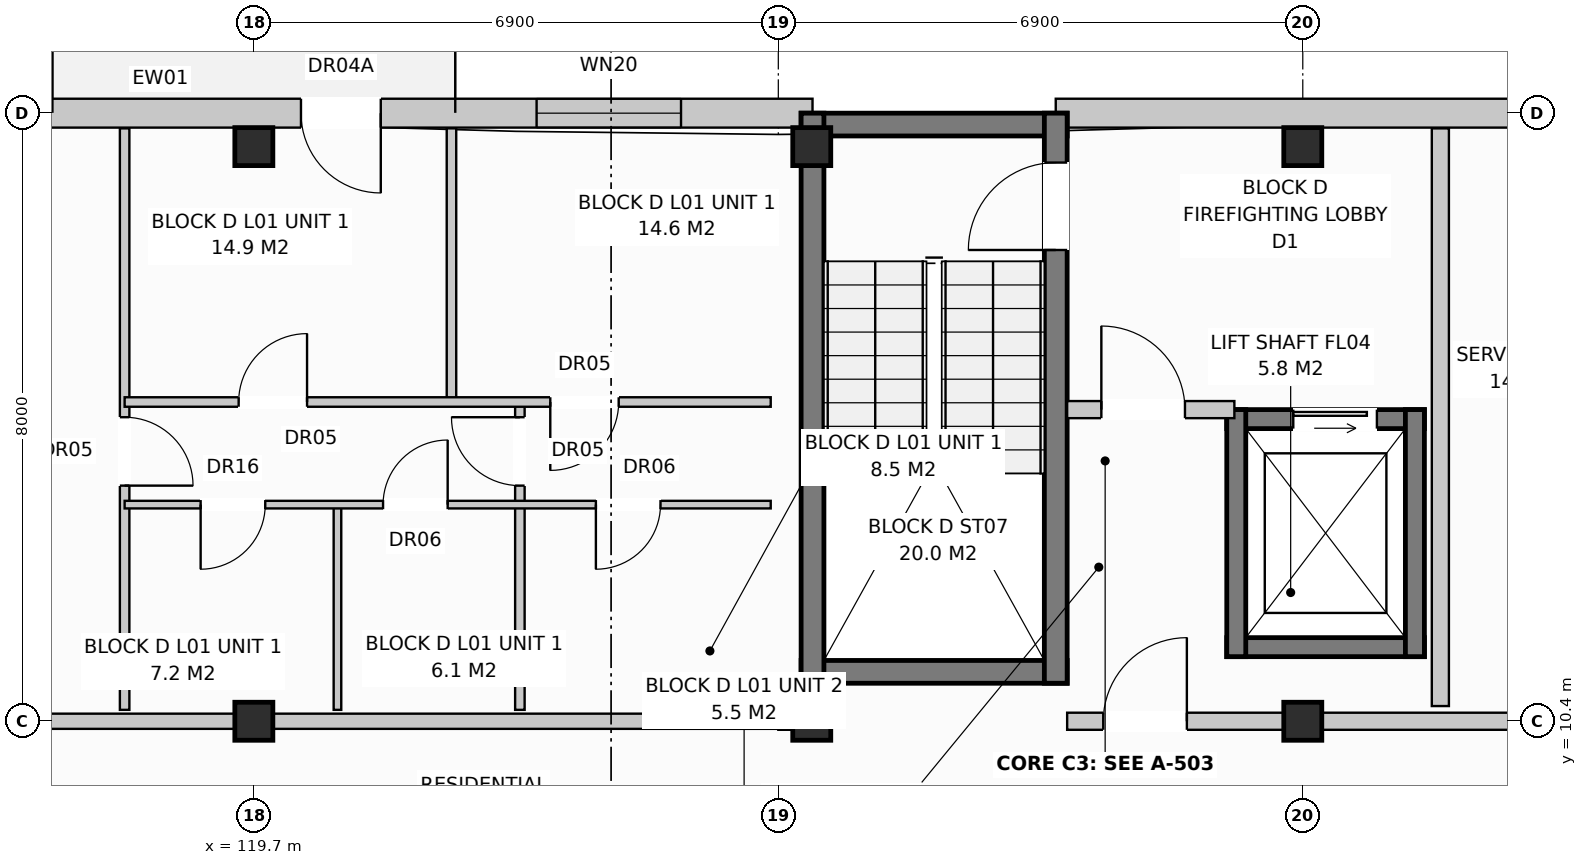
"""IFC4 building model, lengths in metres.
Left out: names, types, materials, properties, quantities, classifications, styles, units other than length and angle.
Written with IfcOpenShell. Run it as: python <this file> out.ifc"""

import sys

from ifc_helpers import new_model, si_unit, direction, frame, frame_2d, origin, origin_with_axes, origin_2d, place, context, subcontext, project, spatial, rectangle, extrude, element, fill, save


model = new_model("IFC4")
c1 = context("Model", 3, precision=1e-05, world=origin(), true_north=direction((0.0, 1.0)))
c2 = subcontext(c1, "Body", "Model", "MODEL_VIEW")
j1 = project(units=[si_unit("LENGTHUNIT", "METRE"), si_unit("PLANEANGLEUNIT", "RADIAN")], contexts=[c1])
p1 = place(None, origin())
s1 = spatial("IfcSite", under=j1, at=p1, CompositionType="ELEMENT")
p2 = place(p1, origin())
s2 = spatial("IfcBuilding", under=s1, at=p2, CompositionType="ELEMENT")
p3 = place(p2, frame((0.0, 0.0, 4.4)))
s3 = spatial("IfcBuildingStorey", under=s2, at=p3, CompositionType="ELEMENT", Elevation=4.4)
for number, where, z_axis, x_axis in (
    (1, (119.7, 10.4, 0.0), (0.0, 0.0, 1.0), (1.0, 0.0, 0.0)),
    (2, (119.7, 17.96, 0.0), (0.0, 0.0, 1.0), (1.0, 0.0, 0.0)),
    (3, (127.04, 10.4, 0.0), (0.0, 0.0, 1.0), (1.0, 0.0, 0.0)),
    (4, (127.04, 17.96, 0.0), (0.0, 0.0, 1.0), (1.0, 0.0, 0.0)),
    (5, (133.5, 10.4, 0.0), (0.0, 0.0, 1.0), (1.0, 0.0, 0.0)),
    (6, (133.5, 17.96, 0.0), (0.0, 0.0, 1.0), (1.0, 0.0, 0.0)),
):
    element("IfcColumn", number, at=place(p3, frame(where, z_axis=z_axis, x_axis=x_axis)), inside=s3, PredefinedType="COLUMN", context=c2, shape_type="SweptSolid", body=[
        extrude(rectangle(XDim=0.5, YDim=0.5, at=origin_2d()), origin(), (0.0, 0.0, 1.0), 3.6),
    ])
p4 = place(p3, frame((112.98, 18.4, 0.0), z_axis=(0.0, 0.0, 1.0), x_axis=(1.0, 0.0, 0.0)))
e7 = element("IfcWall", 7, at=p4, inside=s3, PredefinedType="STANDARD", context=c2, shape_type="SweptSolid", body=[
    extrude(rectangle(XDim=14.07, YDim=0.38, at=frame_2d((7.035, 0.0))), origin(), (0.0, 0.0, 1.0), 3.33),
])
p5 = place(p4, frame((7.34, 0.0, 0.0)))
e8 = element("IfcOpeningElement", 8, at=p5, cuts=e7, PredefinedType="OPENING", context=c2, shape_type="SweptSolid", body=[
    extrude(rectangle(XDim=1.05, YDim=2.12, at=frame_2d((0.525, 1.06))), frame((0.0, 0.202, 0.0), z_axis=(0.0, -1.0, 0.0), x_axis=(1.0, 0.0, 0.0)), (0.0, 0.0, 1.0), 0.404),
])
p6 = place(p4, frame((1.59, 0.0, 0.8)))
e9 = element("IfcOpeningElement", 9, at=p6, cuts=e7, PredefinedType="OPENING", context=c2, shape_type="SweptSolid", body=[
    extrude(rectangle(XDim=1.8, YDim=1.7, at=frame_2d((0.9, 0.85))), frame((0.0, 0.202, 0.0), z_axis=(0.0, -1.0, 0.0), x_axis=(1.0, 0.0, 0.0)), (0.0, 0.0, 1.0), 0.404),
])
p7 = place(p4, frame((10.44, 0.0, 0.8)))
e10 = element("IfcOpeningElement", 10, at=p7, cuts=e7, PredefinedType="OPENING", context=c2, shape_type="SweptSolid", body=[
    extrude(rectangle(XDim=1.9, YDim=1.85, at=frame_2d((0.95, 0.925))), frame((0.0, 0.202, 0.0), z_axis=(0.0, -1.0, 0.0), x_axis=(1.0, 0.0, 0.0)), (0.0, 0.0, 1.0), 0.404),
])
p8 = place(p3, frame((130.25, 18.4, 0.0), z_axis=(0.0, 0.0, 1.0), x_axis=(1.0, 0.0, 0.0)))
e11 = element("IfcWall", 11, at=p8, inside=s3, PredefinedType="STANDARD", context=c2, shape_type="SweptSolid", body=[
    extrude(rectangle(XDim=17.5, YDim=0.38, at=frame_2d((8.75, 0.0))), origin(), (0.0, 0.0, 1.0), 3.33),
])
p9 = place(p8, frame((11.923, 0.0, 0.0)))
e12 = element("IfcOpeningElement", 12, at=p9, cuts=e11, PredefinedType="OPENING", context=c2, shape_type="SweptSolid", body=[
    extrude(rectangle(XDim=1.05, YDim=2.12, at=frame_2d((0.525, 1.06))), frame((0.0, 0.202, 0.0), z_axis=(0.0, -1.0, 0.0), x_axis=(1.0, 0.0, 0.0)), (0.0, 0.0, 1.0), 0.404),
])
p10 = place(p8, frame((10.72, 0.0, 0.9)))
e13 = element("IfcOpeningElement", 13, at=p10, cuts=e11, PredefinedType="OPENING", context=c2, shape_type="SweptSolid", body=[
    extrude(rectangle(XDim=0.95, YDim=1.55, at=frame_2d((0.475, 0.775))), frame((0.0, 0.202, 0.0), z_axis=(0.0, -1.0, 0.0), x_axis=(1.0, 0.0, 0.0)), (0.0, 0.0, 1.0), 0.404),
])
p11 = place(p8, frame((14.62, 0.0, 0.8)))
e14 = element("IfcOpeningElement", 14, at=p11, cuts=e11, PredefinedType="OPENING", context=c2, shape_type="SweptSolid", body=[
    extrude(rectangle(XDim=1.8, YDim=1.7, at=frame_2d((0.9, 0.85))), frame((0.0, 0.202, 0.0), z_axis=(0.0, -1.0, 0.0), x_axis=(1.0, 0.0, 0.0)), (0.0, 0.0, 1.0), 0.404),
])
for number, where, z_axis, x_axis in (
    (15, (126.9, 18.25, 0.0), (0.0, 0.0, 1.0), (1.0, 0.0, 0.0)),
    (16, (126.9, 11.05, 0.0), (0.0, 0.0, 1.0), (1.0, 0.0, 0.0)),
):
    element("IfcWall", number, at=place(p3, frame(where, z_axis=z_axis, x_axis=x_axis)), inside=s3, PredefinedType="SHEAR", context=c2, shape_type="SweptSolid", body=[
        extrude(rectangle(XDim=3.5, YDim=0.3, at=frame_2d((1.75, 0.0))), origin(), (0.0, 0.0, 1.0), 3.33),
    ])
p12 = place(p3, frame((127.05, 10.9, 0.0), z_axis=(0.0, 0.0, 1.0), x_axis=(0.0, 1.0, 0.0)))
e17 = element("IfcWall", 17, at=p12, inside=s3, PredefinedType="SHEAR", context=c2, shape_type="SweptSolid", body=[
    extrude(rectangle(XDim=7.5, YDim=0.3, at=frame_2d((3.75, 0.0))), origin(), (0.0, 0.0, 1.0), 3.33),
])
p13 = place(p3, frame((130.25, 10.9, 0.0), z_axis=(0.0, 0.0, 1.0), x_axis=(0.0, 1.0, 0.0)))
e18 = element("IfcWall", 18, at=p13, inside=s3, PredefinedType="SHEAR", context=c2, shape_type="SweptSolid", body=[
    extrude(rectangle(XDim=7.5, YDim=0.3, at=frame_2d((3.75, 0.0))), origin(), (0.0, 0.0, 1.0), 3.33),
])
p14 = place(p13, frame((5.7, 0.0, 0.0)))
e19 = element("IfcOpeningElement", 19, at=p14, cuts=e18, PredefinedType="OPENING", context=c2, shape_type="SweptSolid", body=[
    extrude(rectangle(XDim=1.15, YDim=2.15, at=frame_2d((0.575, 1.075))), frame((0.0, 0.162, 0.0), z_axis=(0.0, -1.0, 0.0), x_axis=(1.0, 0.0, 0.0)), (0.0, 0.0, 1.0), 0.324),
])
p15 = place(p3, frame((132.5, 14.375, 0.0), z_axis=(0.0, 0.0, 1.0), x_axis=(1.0, 0.0, 0.0)))
e20 = element("IfcWall", 20, at=p15, inside=s3, PredefinedType="SHEAR", context=c2, shape_type="SweptSolid", body=[
    extrude(rectangle(XDim=2.6, YDim=0.25, at=frame_2d((1.3, 0.0))), origin(), (0.0, 0.0, 1.0), 3.33),
])
p16 = place(p15, frame((0.875, 0.0, 0.0)))
e21 = element("IfcOpeningElement", 21, at=p16, cuts=e20, PredefinedType="OPENING", context=c2, shape_type="SweptSolid", body=[
    extrude(rectangle(XDim=1.1, YDim=2.1, at=frame_2d((0.55, 1.05))), frame((0.0, 0.137, 0.0), z_axis=(0.0, -1.0, 0.0), x_axis=(1.0, 0.0, 0.0)), (0.0, 0.0, 1.0), 0.274),
])
p17 = place(p3, frame((132.5, 11.375, 0.0), z_axis=(0.0, 0.0, 1.0), x_axis=(1.0, 0.0, 0.0)))
e22 = element("IfcWall", 22, at=p17, inside=s3, PredefinedType="SHEAR", context=c2, shape_type="SweptSolid", body=[
    extrude(rectangle(XDim=2.6, YDim=0.25, at=frame_2d((1.3, 0.0))), origin(), (0.0, 0.0, 1.0), 3.33),
])
for number, where, z_axis, x_axis in (
    (23, (132.625, 11.25, 0.0), (0.0, 0.0, 1.0), (0.0, 1.0, 0.0)),
    (24, (134.975, 11.25, 0.0), (0.0, 0.0, 1.0), (0.0, 1.0, 0.0)),
):
    element("IfcWall", number, at=place(p3, frame(where, z_axis=z_axis, x_axis=x_axis)), inside=s3, PredefinedType="SHEAR", context=c2, shape_type="SweptSolid", body=[
        extrude(rectangle(XDim=3.25, YDim=0.25, at=frame_2d((1.625, 0.0))), origin(), (0.0, 0.0, 1.0), 3.33),
    ])
p18 = place(p3, frame((135.31, 10.6, 0.0), z_axis=(0.0, 0.0, 1.0), x_axis=(0.0, 1.0, 0.0)))
e25 = element("IfcWall", 25, at=p18, inside=s3, PredefinedType="PARTITIONING", context=c2, shape_type="SweptSolid", body=[
    extrude(rectangle(XDim=7.6, YDim=0.225, at=frame_2d((3.8, 0.0))), origin(), (0.0, 0.0, 1.0), 2.99),
])
p19 = place(p3, frame((130.4, 14.5, 0.0), z_axis=(0.0, 0.0, 1.0), x_axis=(1.0, 0.0, 0.0)))
e26 = element("IfcWall", 26, at=p19, inside=s3, PredefinedType="PARTITIONING", context=c2, shape_type="SweptSolid", body=[
    extrude(rectangle(XDim=2.2, YDim=0.225, at=frame_2d((1.1, 0.0))), origin(), (0.0, 0.0, 1.0), 3.33),
])
p20 = place(p19, frame((0.45, 0.0, 0.0)))
e27 = element("IfcOpeningElement", 27, at=p20, cuts=e26, PredefinedType="OPENING", context=c2, shape_type="SweptSolid", body=[
    extrude(rectangle(XDim=1.1, YDim=2.15, at=frame_2d((0.55, 1.075))), frame((0.0, 0.125, 0.0), z_axis=(0.0, -1.0, 0.0), x_axis=(1.0, 0.0, 0.0)), (0.0, 0.0, 1.0), 0.249),
])
p21 = place(p3, frame((126.6, 10.4, 0.0), z_axis=(0.0, 0.0, 1.0), x_axis=(1.0, 0.0, 0.0)))
e28 = element("IfcWall", 28, at=p21, inside=s3, PredefinedType="PARTITIONING", context=c2, shape_type="SweptSolid", body=[
    extrude(rectangle(XDim=0.3, YDim=0.225, at=frame_2d((0.15, 0.0))), origin(), (0.0, 0.0, 1.0), 3.33),
])
p22 = place(p3, frame((130.4, 10.4, 0.0), z_axis=(0.0, 0.0, 1.0), x_axis=(1.0, 0.0, 0.0)))
e29 = element("IfcWall", 29, at=p22, inside=s3, PredefinedType="PARTITIONING", context=c2, shape_type="SweptSolid", body=[
    extrude(rectangle(XDim=10.0, YDim=0.225, at=frame_2d((5.0, 0.0))), origin(), (0.0, 0.0, 1.0), 2.77),
])
p23 = place(p22, frame((0.475, 0.0, 0.0)))
e30 = element("IfcOpeningElement", 30, at=p23, cuts=e29, PredefinedType="OPENING", context=c2, shape_type="SweptSolid", body=[
    extrude(rectangle(XDim=1.1, YDim=2.15, at=frame_2d((0.55, 1.075))), frame((0.0, 0.125, 0.0), z_axis=(0.0, -1.0, 0.0), x_axis=(1.0, 0.0, 0.0)), (0.0, 0.0, 1.0), 0.249),
])
p24 = place(p22, frame((5.85, 0.0, 0.0)))
e31 = element("IfcOpeningElement", 31, at=p24, cuts=e29, PredefinedType="OPENING", context=c2, shape_type="SweptSolid", body=[
    extrude(rectangle(XDim=0.9, YDim=2.1, at=frame_2d((0.45, 1.05))), frame((0.0, 0.125, 0.0), z_axis=(0.0, -1.0, 0.0), x_axis=(1.0, 0.0, 0.0)), (0.0, 0.0, 1.0), 0.249),
])
p25 = place(p22, frame((7.9, 0.0, 0.0)))
e32 = element("IfcOpeningElement", 32, at=p25, cuts=e29, PredefinedType="OPENING", context=c2, shape_type="SweptSolid", body=[
    extrude(rectangle(XDim=0.95, YDim=2.15, at=frame_2d((0.475, 1.075))), frame((0.0, 0.125, 0.0), z_axis=(0.0, -1.0, 0.0), x_axis=(1.0, 0.0, 0.0)), (0.0, 0.0, 1.0), 0.249),
])
p26 = place(p3, frame((112.8, 10.4, 0.0), z_axis=(0.0, 0.0, 1.0), x_axis=(1.0, 0.0, 0.0)))
e33 = element("IfcWall", 33, at=p26, inside=s3, PredefinedType="PARTITIONING", context=c2, shape_type="SweptSolid", body=[
    extrude(rectangle(XDim=13.8, YDim=0.2, at=frame_2d((6.9, 0.0))), origin(), (0.0, 0.0, 1.0), 2.77),
])
p27 = place(p26, frame((2.4, 0.0, 0.0)))
e34 = element("IfcOpeningElement", 34, at=p27, cuts=e33, PredefinedType="OPENING", context=c2, shape_type="SweptSolid", body=[
    extrude(rectangle(XDim=0.95, YDim=2.15, at=frame_2d((0.475, 1.075))), frame((0.0, 0.112, 0.0), z_axis=(0.0, -1.0, 0.0), x_axis=(1.0, 0.0, 0.0)), (0.0, 0.0, 1.0), 0.224),
])
p28 = place(p3, frame((118.0, 10.55, 0.0), z_axis=(0.0, 0.0, 1.0), x_axis=(0.0, 1.0, 0.0)))
e35 = element("IfcWall", 35, at=p28, inside=s3, PredefinedType="PARTITIONING", context=c2, shape_type="SweptSolid", body=[
    extrude(rectangle(XDim=7.65, YDim=0.125, at=frame_2d((3.825, 0.0))), origin(), (0.0, 0.0, 1.0), 3.33),
])
p29 = place(p28, frame((2.95, 0.0, 0.0)))
e36 = element("IfcOpeningElement", 36, at=p29, cuts=e35, PredefinedType="OPENING", context=c2, shape_type="SweptSolid", body=[
    extrude(rectangle(XDim=0.9, YDim=2.1, at=frame_2d((0.45, 1.05))), frame((0.0, 0.074, 0.0), z_axis=(0.0, -1.0, 0.0), x_axis=(1.0, 0.0, 0.0)), (0.0, 0.0, 1.0), 0.149),
])
p30 = place(p3, frame((120.8, 10.55, 0.0), z_axis=(0.0, 0.0, 1.0), x_axis=(0.0, 1.0, 0.0)))
e37 = element("IfcWall", 37, at=p30, inside=s3, PredefinedType="PARTITIONING", context=c2, shape_type="SweptSolid", body=[
    extrude(rectangle(XDim=2.7, YDim=0.1, at=frame_2d((1.35, 0.0))), origin(), (0.0, 0.0, 1.0), 3.33),
])
p31 = place(p3, frame((123.2, 10.55, 0.0), z_axis=(0.0, 0.0, 1.0), x_axis=(0.0, 1.0, 0.0)))
e38 = element("IfcWall", 38, at=p31, inside=s3, PredefinedType="PARTITIONING", context=c2, shape_type="SweptSolid", body=[
    extrude(rectangle(XDim=4.05, YDim=0.125, at=frame_2d((2.025, 0.0))), origin(), (0.0, 0.0, 1.0), 3.33),
])
p32 = place(p31, frame((2.95, 0.0, 0.0)))
e39 = element("IfcOpeningElement", 39, at=p32, cuts=e38, PredefinedType="OPENING", context=c2, shape_type="SweptSolid", body=[
    extrude(rectangle(XDim=0.9, YDim=2.1, at=frame_2d((0.45, 1.05))), frame((0.0, 0.074, 0.0), z_axis=(0.0, -1.0, 0.0), x_axis=(1.0, 0.0, 0.0)), (0.0, 0.0, 1.0), 0.149),
])
p33 = place(p3, frame((122.3, 14.6, 0.0), z_axis=(0.0, 0.0, 1.0), x_axis=(0.0, 1.0, 0.0)))
e40 = element("IfcWall", 40, at=p33, inside=s3, PredefinedType="PARTITIONING", context=c2, shape_type="SweptSolid", body=[
    extrude(rectangle(XDim=3.6, YDim=0.125, at=frame_2d((1.8, 0.0))), origin(), (0.0, 0.0, 1.0), 3.33),
])
p34 = place(p3, frame((118.0, 13.25, 0.0), z_axis=(0.0, 0.0, 1.0), x_axis=(1.0, 0.0, 0.0)))
e41 = element("IfcWall", 41, at=p34, inside=s3, PredefinedType="PARTITIONING", context=c2, shape_type="SweptSolid", body=[
    extrude(rectangle(XDim=8.5, YDim=0.1, at=frame_2d((4.25, 0.0))), origin(), (0.0, 0.0, 1.0), 3.33),
])
p35 = place(p34, frame((1.0, 0.0, 0.0)))
e42 = element("IfcOpeningElement", 42, at=p35, cuts=e41, PredefinedType="OPENING", context=c2, shape_type="SweptSolid", body=[
    extrude(rectangle(XDim=0.85, YDim=2.1, at=frame_2d((0.425, 1.05))), frame((0.0, 0.062, 0.0), z_axis=(0.0, -1.0, 0.0), x_axis=(1.0, 0.0, 0.0)), (0.0, 0.0, 1.0), 0.124),
])
p36 = place(p34, frame((3.4, 0.0, 0.0)))
e43 = element("IfcOpeningElement", 43, at=p36, cuts=e41, PredefinedType="OPENING", context=c2, shape_type="SweptSolid", body=[
    extrude(rectangle(XDim=0.85, YDim=2.05, at=frame_2d((0.425, 1.025))), frame((0.0, 0.062, 0.0), z_axis=(0.0, -1.0, 0.0), x_axis=(1.0, 0.0, 0.0)), (0.0, 0.0, 1.0), 0.124),
])
p37 = place(p34, frame((6.2, 0.0, 0.0)))
e44 = element("IfcOpeningElement", 44, at=p37, cuts=e41, PredefinedType="OPENING", context=c2, shape_type="SweptSolid", body=[
    extrude(rectangle(XDim=0.85, YDim=2.05, at=frame_2d((0.425, 1.025))), frame((0.0, 0.062, 0.0), z_axis=(0.0, -1.0, 0.0), x_axis=(1.0, 0.0, 0.0)), (0.0, 0.0, 1.0), 0.124),
])
p38 = place(p3, frame((118.0, 14.6, 0.0), z_axis=(0.0, 0.0, 1.0), x_axis=(1.0, 0.0, 0.0)))
e45 = element("IfcWall", 45, at=p38, inside=s3, PredefinedType="PARTITIONING", context=c2, shape_type="SweptSolid", body=[
    extrude(rectangle(XDim=8.5, YDim=0.125, at=frame_2d((4.25, 0.0))), origin(), (0.0, 0.0, 1.0), 3.33),
])
p39 = place(p38, frame((1.5, 0.0, 0.0)))
e46 = element("IfcOpeningElement", 46, at=p39, cuts=e45, PredefinedType="OPENING", context=c2, shape_type="SweptSolid", body=[
    extrude(rectangle(XDim=0.9, YDim=2.1, at=frame_2d((0.45, 1.05))), frame((0.0, 0.074, 0.0), z_axis=(0.0, -1.0, 0.0), x_axis=(1.0, 0.0, 0.0)), (0.0, 0.0, 1.0), 0.149),
])
p40 = place(p38, frame((5.6, 0.0, 0.0)))
e47 = element("IfcOpeningElement", 47, at=p40, cuts=e45, PredefinedType="OPENING", context=c2, shape_type="SweptSolid", body=[
    extrude(rectangle(XDim=0.9, YDim=2.1, at=frame_2d((0.45, 1.05))), frame((0.0, 0.074, 0.0), z_axis=(0.0, -1.0, 0.0), x_axis=(1.0, 0.0, 0.0)), (0.0, 0.0, 1.0), 0.149),
])
p41 = place(p5, frame((1.05, 0.0, 0.0), z_axis=(0.0, 0.0, 1.0), x_axis=(-1.0, 0.0, 0.0)))
e48 = element("IfcDoor", 48, at=p41, inside=s3, OperationType="SINGLE_SWING_RIGHT", PredefinedType="DOOR", context=c2, shape_type="SweptSolid", body=[
    extrude(rectangle(XDim=1.05, YDim=2.12, at=frame_2d((0.525, 1.06))), frame((0.0, 0.025, 0.0), z_axis=(0.0, -1.0, 0.0), x_axis=(1.0, 0.0, 0.0)), (0.0, 0.0, 1.0), 0.05),
])
fill(e8, e48)
p42 = place(p7, origin_with_axes())
e49 = element("IfcWindow", 49, at=p42, inside=s3, PartitioningType="SINGLE_PANEL", PredefinedType="WINDOW", context=c2, shape_type="SweptSolid", body=[
    extrude(rectangle(XDim=1.9, YDim=1.85, at=frame_2d((0.95, 0.925))), frame((0.0, 0.03, 0.0), z_axis=(0.0, -1.0, 0.0), x_axis=(1.0, 0.0, 0.0)), (0.0, 0.0, 1.0), 0.06),
])
fill(e10, e49)
p43 = place(p14, origin_with_axes())
e50 = element("IfcDoor", 50, at=p43, inside=s3, OperationType="SINGLE_SWING_LEFT", PredefinedType="DOOR", context=c2, shape_type="SweptSolid", body=[
    extrude(rectangle(XDim=1.15, YDim=2.15, at=frame_2d((0.575, 1.075))), frame((0.0, 0.025, 0.0), z_axis=(0.0, -1.0, 0.0), x_axis=(1.0, 0.0, 0.0)), (0.0, 0.0, 1.0), 0.05),
])
fill(e19, e50)
p44 = place(p16, origin_with_axes())
e51 = element("IfcDoor", 51, at=p44, inside=s3, OperationType="SLIDING_TO_LEFT", PredefinedType="DOOR", context=c2, shape_type="SweptSolid", body=[
    extrude(rectangle(XDim=1.1, YDim=2.1, at=frame_2d((0.55, 1.05))), frame((0.0, 0.025, 0.0), z_axis=(0.0, -1.0, 0.0), x_axis=(1.0, 0.0, 0.0)), (0.0, 0.0, 1.0), 0.05),
])
fill(e21, e51)
p45 = place(p20, origin_with_axes())
e52 = element("IfcDoor", 52, at=p45, inside=s3, OperationType="SINGLE_SWING_LEFT", PredefinedType="DOOR", context=c2, shape_type="SweptSolid", body=[
    extrude(rectangle(XDim=1.1, YDim=2.15, at=frame_2d((0.55, 1.075))), frame((0.0, 0.025, 0.0), z_axis=(0.0, -1.0, 0.0), x_axis=(1.0, 0.0, 0.0)), (0.0, 0.0, 1.0), 0.05),
])
fill(e27, e52)
p46 = place(p23, origin_with_axes())
e53 = element("IfcDoor", 53, at=p46, inside=s3, OperationType="SINGLE_SWING_RIGHT", PredefinedType="DOOR", context=c2, shape_type="SweptSolid", body=[
    extrude(rectangle(XDim=1.1, YDim=2.15, at=frame_2d((0.55, 1.075))), frame((0.0, 0.025, 0.0), z_axis=(0.0, -1.0, 0.0), x_axis=(1.0, 0.0, 0.0)), (0.0, 0.0, 1.0), 0.05),
])
fill(e30, e53)
p47 = place(p29, frame((0.9, 0.0, 0.0), z_axis=(0.0, 0.0, 1.0), x_axis=(-1.0, 0.0, 0.0)))
e54 = element("IfcDoor", 54, at=p47, inside=s3, OperationType="SINGLE_SWING_LEFT", PredefinedType="DOOR", context=c2, shape_type="SweptSolid", body=[
    extrude(rectangle(XDim=0.9, YDim=2.1, at=frame_2d((0.45, 1.05))), frame((0.0, 0.025, 0.0), z_axis=(0.0, -1.0, 0.0), x_axis=(1.0, 0.0, 0.0)), (0.0, 0.0, 1.0), 0.05),
])
fill(e36, e54)
p48 = place(p32, origin_with_axes())
e55 = element("IfcDoor", 55, at=p48, inside=s3, OperationType="SINGLE_SWING_RIGHT", PredefinedType="DOOR", context=c2, shape_type="SweptSolid", body=[
    extrude(rectangle(XDim=0.9, YDim=2.1, at=frame_2d((0.45, 1.05))), frame((0.0, 0.025, 0.0), z_axis=(0.0, -1.0, 0.0), x_axis=(1.0, 0.0, 0.0)), (0.0, 0.0, 1.0), 0.05),
])
fill(e39, e55)
p49 = place(p35, frame((0.85, 0.0, 0.0), z_axis=(0.0, 0.0, 1.0), x_axis=(-1.0, 0.0, 0.0)))
e56 = element("IfcDoor", 56, at=p49, inside=s3, OperationType="SINGLE_SWING_LEFT", PredefinedType="DOOR", context=c2, shape_type="SweptSolid", body=[
    extrude(rectangle(XDim=0.85, YDim=2.1, at=frame_2d((0.425, 1.05))), frame((0.0, 0.025, 0.0), z_axis=(0.0, -1.0, 0.0), x_axis=(1.0, 0.0, 0.0)), (0.0, 0.0, 1.0), 0.05),
])
fill(e42, e56)
p50 = place(p36, origin_with_axes())
e57 = element("IfcDoor", 57, at=p50, inside=s3, OperationType="SINGLE_SWING_RIGHT", PredefinedType="DOOR", context=c2, shape_type="SweptSolid", body=[
    extrude(rectangle(XDim=0.85, YDim=2.05, at=frame_2d((0.425, 1.025))), frame((0.0, 0.025, 0.0), z_axis=(0.0, -1.0, 0.0), x_axis=(1.0, 0.0, 0.0)), (0.0, 0.0, 1.0), 0.05),
])
fill(e43, e57)
p51 = place(p37, frame((0.85, 0.0, 0.0), z_axis=(0.0, 0.0, 1.0), x_axis=(-1.0, 0.0, 0.0)))
e58 = element("IfcDoor", 58, at=p51, inside=s3, OperationType="SINGLE_SWING_LEFT", PredefinedType="DOOR", context=c2, shape_type="SweptSolid", body=[
    extrude(rectangle(XDim=0.85, YDim=2.05, at=frame_2d((0.425, 1.025))), frame((0.0, 0.025, 0.0), z_axis=(0.0, -1.0, 0.0), x_axis=(1.0, 0.0, 0.0)), (0.0, 0.0, 1.0), 0.05),
])
fill(e44, e58)
p52 = place(p39, origin_with_axes())
e59 = element("IfcDoor", 59, at=p52, inside=s3, OperationType="SINGLE_SWING_RIGHT", PredefinedType="DOOR", context=c2, shape_type="SweptSolid", body=[
    extrude(rectangle(XDim=0.9, YDim=2.1, at=frame_2d((0.45, 1.05))), frame((0.0, 0.025, 0.0), z_axis=(0.0, -1.0, 0.0), x_axis=(1.0, 0.0, 0.0)), (0.0, 0.0, 1.0), 0.05),
])
fill(e46, e59)
p53 = place(p40, frame((0.9, 0.0, 0.0), z_axis=(0.0, 0.0, 1.0), x_axis=(-1.0, 0.0, 0.0)))
e60 = element("IfcDoor", 60, at=p53, inside=s3, OperationType="SINGLE_SWING_LEFT", PredefinedType="DOOR", context=c2, shape_type="SweptSolid", body=[
    extrude(rectangle(XDim=0.9, YDim=2.1, at=frame_2d((0.45, 1.05))), frame((0.0, 0.025, 0.0), z_axis=(0.0, -1.0, 0.0), x_axis=(1.0, 0.0, 0.0)), (0.0, 0.0, 1.0), 0.05),
])
fill(e47, e60)
save(model, sys.argv[1])
